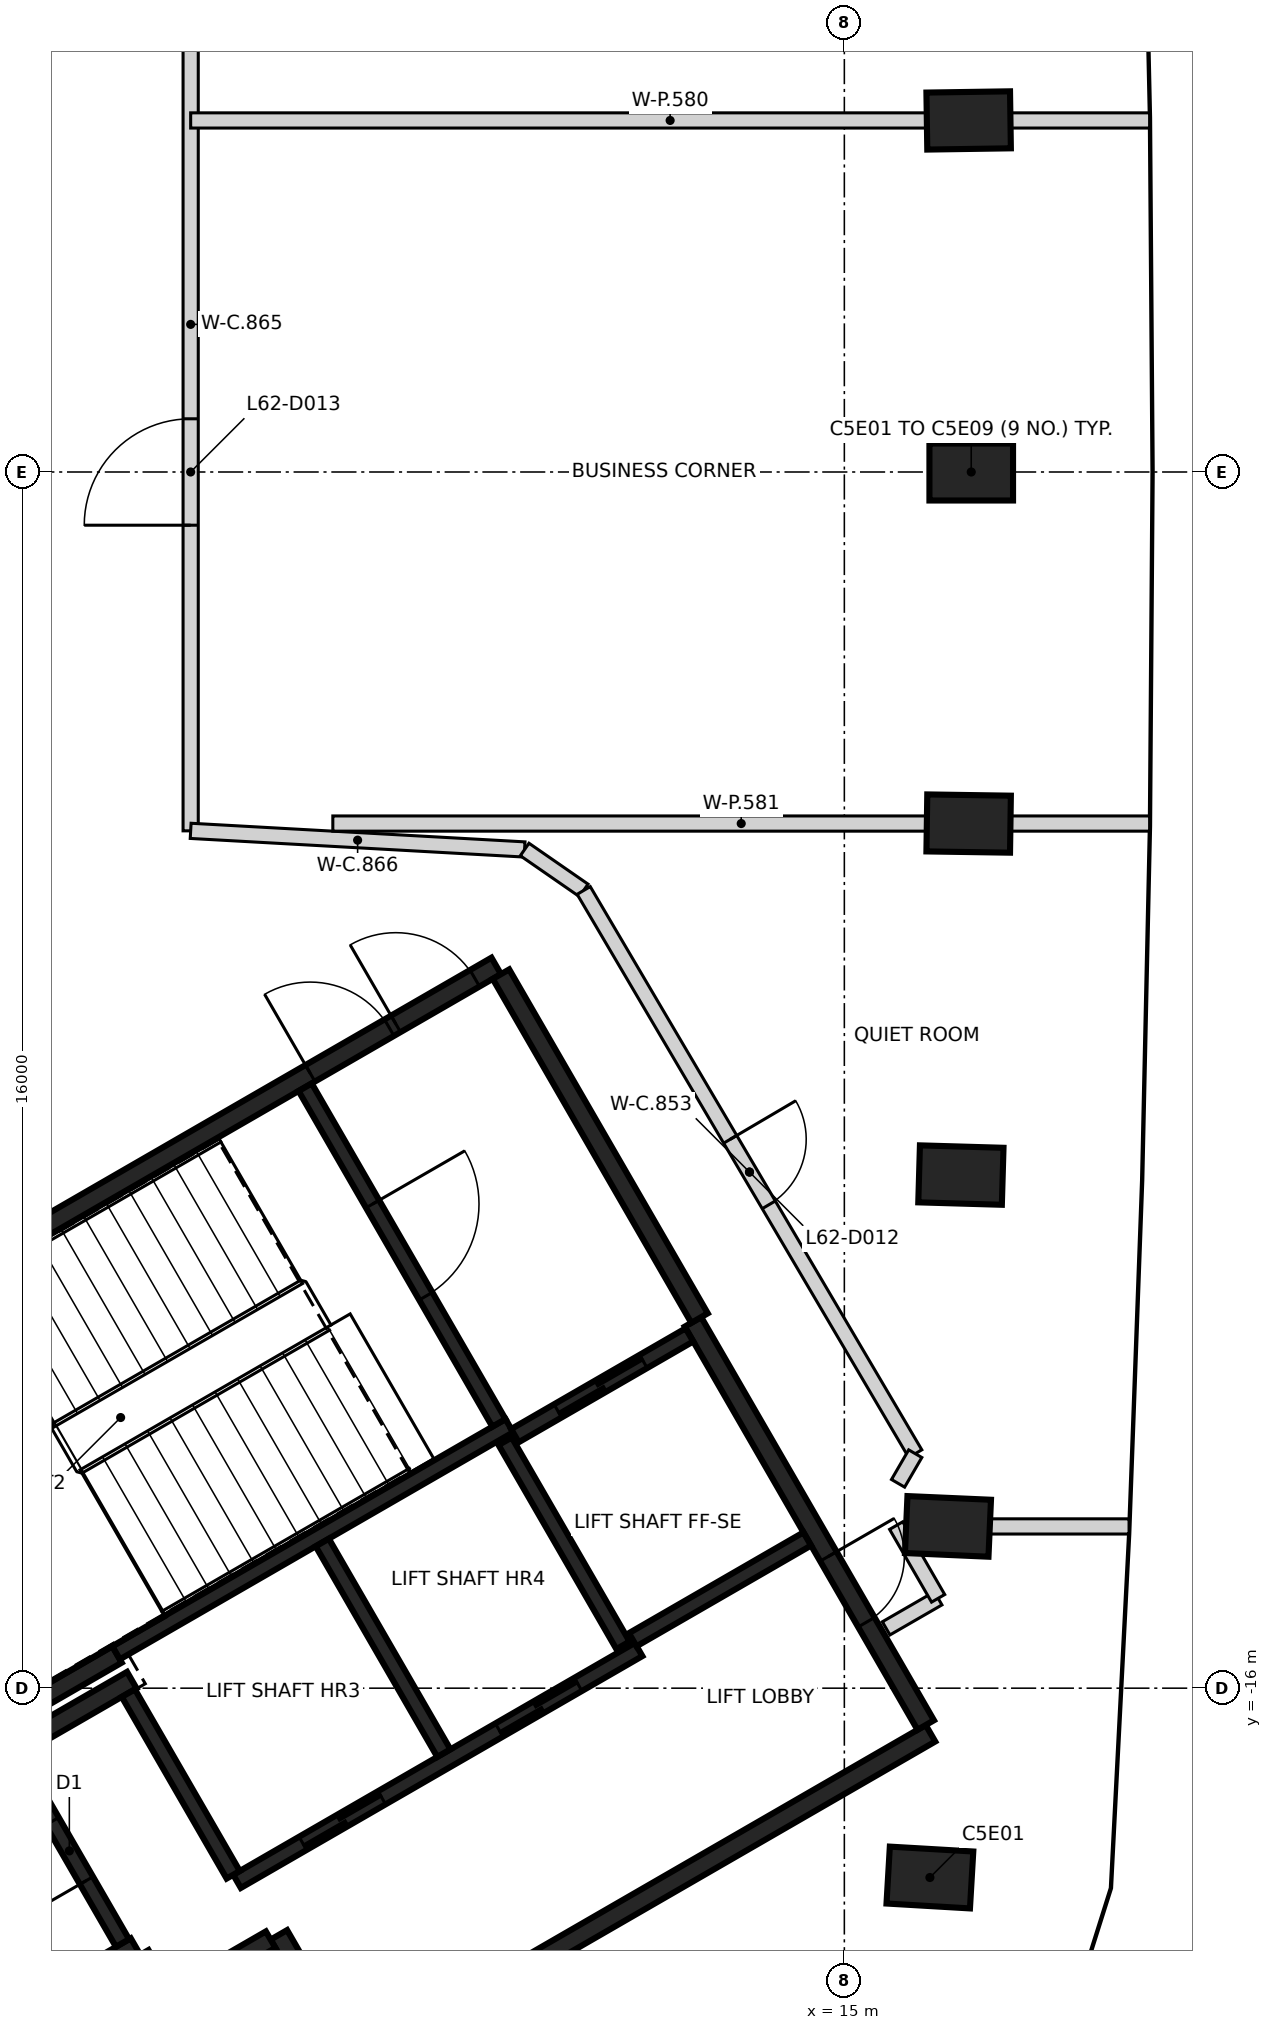
"""IFC4 building model, lengths in metres.
Left out: names, types, materials, properties, quantities, classifications, styles, units other than length and angle.
Written with IfcOpenShell. Run it as: python <this file> out.ifc"""

import sys

from ifc_helpers import new_model, si_unit, direction, frame, frame_2d, origin, origin_2d, place, context, subcontext, project, spatial, rectangle, extrude, element, fill, save


model = new_model("IFC4")
c1 = context("Model", 3, precision=1e-05, world=origin(), true_north=direction((0.0, 1.0)))
c2 = subcontext(c1, "Body", "Model", "MODEL_VIEW")
j1 = project(units=[si_unit("LENGTHUNIT", "METRE"), si_unit("PLANEANGLEUNIT", "RADIAN")], contexts=[c1])
p1 = place(None, origin())
s1 = spatial("IfcSite", under=j1, at=p1, CompositionType="ELEMENT")
p2 = place(p1, origin())
s2 = spatial("IfcBuilding", under=s1, at=p2, CompositionType="ELEMENT")
p3 = place(p2, frame((0.0, 0.0, 246.6)))
s3 = spatial("IfcBuildingStorey", under=s2, at=p3, CompositionType="ELEMENT", Elevation=246.6)
for number, where, z_axis, x_axis in (
    (1, (16.125, -18.491, -0.35), (0.0, 0.0, 1.0), (-0.998, 0.058, 0.0)),
    (2, (16.363, -13.872, -0.35), (0.0, 0.0, 1.0), (-0.999, 0.044, 0.0)),
    (3, (16.533, -9.25, -0.35), (0.0, 0.0, 1.0), (-1.0, 0.029, 0.0)),
    (4, (16.635, -4.625, -0.35), (0.0, 0.0, 1.0), (-1.0, 0.015, 0.0)),
    (5, (16.669, 0.0, -0.35), (0.0, 0.0, 1.0), (1.0, 0.0, 0.0)),
    (6, (16.635, 4.625, -0.35), (0.0, 0.0, 1.0), (1.0, 0.015, 0.0)),
):
    element("IfcColumn", number, at=place(p3, frame(where, z_axis=z_axis, x_axis=x_axis)), inside=s3, PredefinedType="COLUMN", context=c2, shape_type="SweptSolid", body=[
        extrude(rectangle(XDim=1.1, YDim=0.75, at=origin_2d()), origin(), (0.0, 0.0, 1.0), 3.6),
    ])
p4 = place(p3, frame((0.417, -12.273, 0.0), z_axis=(0.0, 0.0, 1.0), x_axis=(0.866021906294, 0.500006057782, 0.0)))
e7 = element("IfcWall", 7, at=p4, inside=s3, PredefinedType="SHEAR", context=c2, shape_type="SweptSolid", body=[
    extrude(rectangle(XDim=11.55, YDim=0.25, at=frame_2d((5.775, 0.0))), origin(), (0.0, 0.0, 1.0), 3.25),
])
p5 = place(p4, frame((10.025, 0.0, 0.0)))
e8 = element("IfcOpeningElement", 8, at=p5, cuts=e7, PredefinedType="OPENING", context=c2, shape_type="SweptSolid", body=[
    extrude(rectangle(XDim=1.2, YDim=2.1, at=frame_2d((0.6, 1.05))), frame((0.0, 0.135, 0.0), z_axis=(0.0, -1.0, 0.0), x_axis=(1.0, 0.0, 0.0)), (0.0, 0.0, 1.0), 0.27),
])
p6 = place(p4, frame((8.725, 0.0, 0.0)))
e9 = element("IfcOpeningElement", 9, at=p6, cuts=e7, PredefinedType="OPENING", context=c2, shape_type="SweptSolid", body=[
    extrude(rectangle(XDim=1.2, YDim=2.1, at=frame_2d((0.6, 1.05))), frame((0.0, 0.135, 0.0), z_axis=(0.0, -1.0, 0.0), x_axis=(1.0, 0.0, 0.0)), (0.0, 0.0, 1.0), 0.27),
])
p7 = place(p3, frame((16.133, -16.594, 0.0), z_axis=(0.0, 0.0, 1.0), x_axis=(-0.866022959057, -0.500004234368, 0.0)))
e10 = element("IfcWall", 10, at=p7, inside=s3, PredefinedType="SHEAR", context=c2, shape_type="SweptSolid", body=[
    extrude(rectangle(XDim=8.75, YDim=0.25, at=frame_2d((4.375, 0.0))), origin(), (0.0, 0.0, 1.0), 3.25),
])
p8 = place(p3, frame((13.008, -11.181, 0.0), z_axis=(0.0, 0.0, 1.0), x_axis=(0.500001955336, -0.866024274868, 0.0)))
e11 = element("IfcWall", 11, at=p8, inside=s3, PredefinedType="SHEAR", context=c2, shape_type="SweptSolid", body=[
    extrude(rectangle(XDim=6.125, YDim=0.25, at=frame_2d((3.062, 0.0))), origin(), (0.0, 0.0, 1.0), 3.25),
])
p9 = place(p8, frame((3.563, 0.0, 0.0)))
e12 = element("IfcOpeningElement", 12, at=p9, cuts=e11, PredefinedType="OPENING", context=c2, shape_type="SweptSolid", body=[
    extrude(rectangle(XDim=1.0, YDim=2.1, at=frame_2d((0.5, 1.05))), frame((0.0, 0.135, 0.0), z_axis=(0.0, -1.0, 0.0), x_axis=(1.0, 0.0, 0.0)), (0.0, 0.0, 1.0), 0.27),
])
p10 = place(p3, frame((10.483, -6.606, 0.0), z_axis=(0.0, 0.0, 1.0), x_axis=(0.49999885962, -0.866026062182, 0.0)))
e13 = element("IfcWall", 13, at=p10, inside=s3, PredefinedType="SHEAR", context=c2, shape_type="SweptSolid", body=[
    extrude(rectangle(XDim=5.225, YDim=0.25, at=frame_2d((2.612, 0.0))), origin(), (0.0, 0.0, 1.0), 3.25),
])
p11 = place(p3, frame((5.675, -19.399, 0.0), z_axis=(0.0, 0.0, 1.0), x_axis=(-0.866026637627, -0.499997862916, 0.0)))
e14 = element("IfcWall", 14, at=p11, inside=s3, PredefinedType="SHEAR", context=c2, shape_type="SweptSolid", body=[
    extrude(rectangle(XDim=2.865, YDim=0.25, at=frame_2d((1.432, 0.0))), origin(), (0.0, 0.0, 1.0), 3.25),
])
p12 = place(p3, frame((5.431, -15.556, 0.0), z_axis=(0.0, 0.0, 1.0), x_axis=(-0.866022940537, -0.500004266446, 0.0)))
e15 = element("IfcWall", 15, at=p12, inside=s3, PredefinedType="SHEAR", context=c2, shape_type="SweptSolid", body=[
    extrude(rectangle(XDim=2.575, YDim=0.25, at=frame_2d((1.287, 0.0))), origin(), (0.0, 0.0, 1.0), 3.25),
])
p13 = place(p3, frame((8.493, -20.86, 0.0), z_axis=(0.0, 0.0, 1.0), x_axis=(-0.500039802285, 0.866002422705, 0.0)))
e16 = element("IfcWall", 16, at=p13, inside=s3, PredefinedType="SHEAR", context=c2, shape_type="SweptSolid", body=[
    extrude(rectangle(XDim=1.865, YDim=0.25, at=frame_2d((0.932, 0.0))), origin(), (0.0, 0.0, 1.0), 3.25),
])
p14 = place(p3, frame((4.145, -16.749, 0.0), z_axis=(0.0, 0.0, 1.0), x_axis=(0.866038183914, 0.499977863513, 0.0)))
e17 = element("IfcWall", 17, at=p14, inside=s3, PredefinedType="SHEAR", context=c2, shape_type="SweptSolid", body=[
    extrude(rectangle(XDim=1.71, YDim=0.25, at=frame_2d((0.855, 0.0))), origin(), (0.0, 0.0, 1.0), 3.25),
])
p15 = place(p3, frame((7.452, -19.308, 0.0), z_axis=(0.0, 0.0, 1.0), x_axis=(-0.866044474677, -0.49996696679, 0.0)))
e18 = element("IfcWall", 18, at=p15, inside=s3, PredefinedType="SHEAR", context=c2, shape_type="SweptSolid", body=[
    extrude(rectangle(XDim=1.584, YDim=0.25, at=frame_2d((0.792, 0.0))), origin(), (0.0, 0.0, 1.0), 3.25),
])
p16 = place(p3, frame((6.017, -19.992, 0.0), z_axis=(0.0, 0.0, 1.0), x_axis=(-0.500364886717, 0.865814633822, 0.0)))
e19 = element("IfcWall", 19, at=p16, inside=s3, PredefinedType="SHEAR", context=c2, shape_type="SweptSolid", body=[
    extrude(rectangle(XDim=0.559, YDim=0.25, at=frame_2d((0.28, 0.0))), origin(), (0.0, 0.0, 1.0), 3.25),
])
p17 = place(p3, frame((5.419, -15.534, 0.0), z_axis=(0.0, 0.0, 1.0), x_axis=(0.866029065029, 0.499993658486, 0.0)))
e20 = element("IfcWall", 20, at=p17, inside=s3, PredefinedType="SHEAR", context=c2, shape_type="SweptSolid", body=[
    extrude(rectangle(XDim=5.974, YDim=0.2, at=frame_2d((2.987, 0.0))), origin(), (0.0, 0.0, 1.0), 3.25),
])
p18 = place(p3, frame((7.01, -18.542, 0.0), z_axis=(0.0, 0.0, 1.0), x_axis=(0.866030299012, 0.499991521122, 0.0)))
e21 = element("IfcWall", 21, at=p18, inside=s3, PredefinedType="SHEAR", context=c2, shape_type="SweptSolid", body=[
    extrude(rectangle(XDim=6.1, YDim=0.2, at=frame_2d((3.05, 0.0))), origin(), (0.0, 0.0, 1.0), 3.25),
])
p19 = place(p18, frame((1.0, 0.0, 0.0)))
e22 = element("IfcOpeningElement", 22, at=p19, cuts=e21, PredefinedType="OPENING", context=c2, shape_type="SweptSolid", body=[
    extrude(rectangle(XDim=1.2, YDim=2.1, at=frame_2d((0.6, 1.05))), frame((0.0, 0.11, 0.0), z_axis=(0.0, -1.0, 0.0), x_axis=(1.0, 0.0, 0.0)), (0.0, 0.0, 1.0), 0.22),
])
p20 = place(p18, frame((3.982, 0.0, 0.0)))
e23 = element("IfcOpeningElement", 23, at=p20, cuts=e21, PredefinedType="OPENING", context=c2, shape_type="SweptSolid", body=[
    extrude(rectangle(XDim=1.2, YDim=2.1, at=frame_2d((0.6, 1.05))), frame((0.0, 0.11, 0.0), z_axis=(0.0, -1.0, 0.0), x_axis=(1.0, 0.0, 0.0)), (0.0, 0.0, 1.0), 0.22),
])
p21 = place(p3, frame((7.906, -8.094, 0.0), z_axis=(0.0, 0.0, 1.0), x_axis=(0.500027839223, -0.866009330205, 0.0)))
e24 = element("IfcWall", 24, at=p21, inside=s3, PredefinedType="SHEAR", context=c2, shape_type="SweptSolid", body=[
    extrude(rectangle(XDim=5.098, YDim=0.2, at=frame_2d((2.549, 0.0))), origin(), (0.0, 0.0, 1.0), 3.25),
])
p22 = place(p21, frame((1.774, 0.0, 0.0)))
e25 = element("IfcOpeningElement", 25, at=p22, cuts=e24, PredefinedType="OPENING", context=c2, shape_type="SweptSolid", body=[
    extrude(rectangle(XDim=1.4, YDim=2.1, at=frame_2d((0.7, 1.05))), frame((0.0, 0.11, 0.0), z_axis=(0.0, -1.0, 0.0), x_axis=(1.0, 0.0, 0.0)), (0.0, 0.0, 1.0), 0.22),
])
p23 = place(p3, frame((8.132, -14.084, 0.0), z_axis=(0.0, 0.0, 1.0), x_axis=(0.499997778408, -0.866026686418, 0.0)))
e26 = element("IfcWall", 26, at=p23, inside=s3, PredefinedType="SHEAR", context=c2, shape_type="SweptSolid", body=[
    extrude(rectangle(XDim=3.198, YDim=0.2, at=frame_2d((1.599, 0.0))), origin(), (0.0, 0.0, 1.0), 3.25),
])
p24 = place(p3, frame((5.503, -19.352, 0.0), z_axis=(0.0, 0.0, 1.0), x_axis=(-0.499986818241, 0.866033014143, 0.0)))
e27 = element("IfcWall", 27, at=p24, inside=s3, PredefinedType="SHEAR", context=c2, shape_type="SweptSolid", body=[
    extrude(rectangle(XDim=2.798, YDim=0.2, at=frame_2d((1.399, 0.0))), origin(), (0.0, 0.0, 1.0), 3.25),
])
p25 = place(p24, frame((0.949, 0.0, 0.0)))
e28 = element("IfcOpeningElement", 28, at=p25, cuts=e27, PredefinedType="OPENING", context=c2, shape_type="SweptSolid", body=[
    extrude(rectangle(XDim=0.9, YDim=2.1, at=frame_2d((0.45, 1.05))), frame((0.0, 0.11, 0.0), z_axis=(0.0, -1.0, 0.0), x_axis=(1.0, 0.0, 0.0)), (0.0, 0.0, 1.0), 0.22),
])
p26 = place(p3, frame((6.96, -18.455, 0.0), z_axis=(0.0, 0.0, 1.0), x_axis=(-0.499926705758, 0.866067716099, 0.0)))
e29 = element("IfcWall", 29, at=p26, inside=s3, PredefinedType="SHEAR", context=c2, shape_type="SweptSolid", body=[
    extrude(rectangle(XDim=2.759, YDim=0.2, at=frame_2d((1.38, 0.0))), origin(), (0.0, 0.0, 1.0), 3.25),
])
p27 = place(p3, frame((12.088, -15.437, 0.0), z_axis=(0.0, 0.0, 1.0), x_axis=(-0.500026960575, 0.86600983753, 0.0)))
e30 = element("IfcWall", 30, at=p27, inside=s3, PredefinedType="SHEAR", context=c2, shape_type="SweptSolid", body=[
    extrude(rectangle(XDim=3.1, YDim=0.2, at=frame_2d((1.55, 0.0))), origin(), (0.0, 0.0, 1.0), 3.25),
])
p28 = place(p3, frame((10.666, -12.678, 0.0), z_axis=(0.0, 0.0, 1.0), x_axis=(0.866018407898, 0.500012117035, 0.0)))
e31 = element("IfcWall", 31, at=p28, inside=s3, PredefinedType="SHEAR", context=c2, shape_type="SweptSolid", body=[
    extrude(rectangle(XDim=2.651, YDim=0.2, at=frame_2d((1.325, 0.0))), origin(), (0.0, 0.0, 1.0), 3.25),
])
p29 = place(p28, frame((0.652, 0.0, 0.0)))
e32 = element("IfcOpeningElement", 32, at=p29, cuts=e31, PredefinedType="OPENING", context=c2, shape_type="SweptSolid", body=[
    extrude(rectangle(XDim=1.3, YDim=2.1, at=frame_2d((0.65, 1.05))), frame((0.0, 0.11, 0.0), z_axis=(0.0, -1.0, 0.0), x_axis=(1.0, 0.0, 0.0)), (0.0, 0.0, 1.0), 0.22),
])
p30 = place(p3, frame((14.512, -14.037, 0.0), z_axis=(0.0, 0.0, 1.0), x_axis=(-0.866018407898, -0.500012117035, 0.0)))
e33 = element("IfcWall", 33, at=p30, inside=s3, PredefinedType="SHEAR", context=c2, shape_type="SweptSolid", body=[
    extrude(rectangle(XDim=2.651, YDim=0.2, at=frame_2d((1.325, 0.0))), origin(), (0.0, 0.0, 1.0), 3.25),
])
p31 = place(p3, frame((6.4, -4.721, 0.0), z_axis=(0.0, 0.0, 1.0), x_axis=(0.0, 1.0, 0.0)))
e34 = element("IfcWall", 34, at=p31, inside=s3, PredefinedType="PARTITIONING", context=c2, shape_type="SweptSolid", body=[
    extrude(rectangle(XDim=13.326, YDim=0.2, at=frame_2d((6.663, 0.0))), origin(), (0.0, 0.0, 1.0), 3.25),
])
p32 = place(p31, frame((4.021, 0.0, 0.0)))
e35 = element("IfcOpeningElement", 35, at=p32, cuts=e34, PredefinedType="OPENING", context=c2, shape_type="SweptSolid", body=[
    extrude(rectangle(XDim=1.4, YDim=2.1, at=frame_2d((0.7, 1.05))), frame((0.0, 0.11, 0.0), z_axis=(0.0, -1.0, 0.0), x_axis=(1.0, 0.0, 0.0)), (0.0, 0.0, 1.0), 0.22),
])
p33 = place(p31, frame((10.865, 0.0, 0.0)))
e36 = element("IfcOpeningElement", 36, at=p33, cuts=e34, PredefinedType="OPENING", context=c2, shape_type="SweptSolid", body=[
    extrude(rectangle(XDim=1.0, YDim=2.1, at=frame_2d((0.5, 1.05))), frame((0.0, 0.11, 0.0), z_axis=(0.0, -1.0, 0.0), x_axis=(1.0, 0.0, 0.0)), (0.0, 0.0, 1.0), 0.22),
])
p34 = place(p3, frame((6.4, -4.721, 0.0), z_axis=(0.0, 0.0, 1.0), x_axis=(0.998447007366, -0.055709725208, 0.0)))
e37 = element("IfcWall", 37, at=p34, inside=s3, PredefinedType="PARTITIONING", context=c2, shape_type="SweptSolid", body=[
    extrude(rectangle(XDim=4.4, YDim=0.2, at=frame_2d((2.2, 0.0))), origin(), (0.0, 0.0, 1.0), 3.25),
])
p35 = place(p3, frame((10.794, -4.966, 0.0), z_axis=(0.0, 0.0, 1.0), x_axis=(0.822266583859, -0.569102508401, 0.0)))
e38 = element("IfcWall", 38, at=p35, inside=s3, PredefinedType="PARTITIONING", context=c2, shape_type="SweptSolid", body=[
    extrude(rectangle(XDim=0.945, YDim=0.2, at=frame_2d((0.473, 0.0))), origin(), (0.0, 0.0, 1.0), 3.25),
])
p36 = place(p3, frame((11.571, -5.505, 0.0), z_axis=(0.0, 0.0, 1.0), x_axis=(0.507291838928, -0.861774326699, 0.0)))
e39 = element("IfcWall", 39, at=p36, inside=s3, PredefinedType="PARTITIONING", context=c2, shape_type="SweptSolid", body=[
    extrude(rectangle(XDim=8.599, YDim=0.2, at=frame_2d((4.299, 0.0))), origin(), (0.0, 0.0, 1.0), 3.25),
])
p37 = place(p36, frame((3.799, 0.0, 0.0)))
e40 = element("IfcOpeningElement", 40, at=p37, cuts=e39, PredefinedType="OPENING", context=c2, shape_type="SweptSolid", body=[
    extrude(rectangle(XDim=1.0, YDim=2.1, at=frame_2d((0.5, 1.05))), frame((0.0, 0.11, 0.0), z_axis=(0.0, -1.0, 0.0), x_axis=(1.0, 0.0, 0.0)), (0.0, 0.0, 1.0), 0.22),
])
p38 = place(p3, frame((15.55, -15.213, 0.0), z_axis=(0.0, 0.0, 1.0), x_axis=(0.865989998118, 0.500061319399, 0.0)))
e41 = element("IfcWall", 41, at=p38, inside=s3, PredefinedType="PARTITIONING", context=c2, shape_type="SweptSolid", body=[
    extrude(rectangle(XDim=0.79, YDim=0.2, at=frame_2d((0.395, 0.0))), origin(), (0.0, 0.0, 1.0), 2.35),
])
p39 = place(p3, frame((15.933, -12.915, 0.0), z_axis=(0.0, 0.0, 1.0), x_axis=(-0.502017930819, -0.864857211993, 0.0)))
e42 = element("IfcWall", 42, at=p39, inside=s3, PredefinedType="PARTITIONING", context=c2, shape_type="SweptSolid", body=[
    extrude(rectangle(XDim=0.451, YDim=0.2, at=frame_2d((0.226, 0.0))), origin(), (0.0, 0.0, 1.0), 3.25),
])
p40 = place(p3, frame((15.682, -13.861, 0.0), z_axis=(0.0, 0.0, 1.0), x_axis=(0.499633176362, -0.866237085952, 0.0)))
e43 = element("IfcWall", 43, at=p40, inside=s3, PredefinedType="PARTITIONING", context=c2, shape_type="SweptSolid", body=[
    extrude(rectangle(XDim=1.105, YDim=0.2, at=frame_2d((0.552, 0.0))), origin(), (0.0, 0.0, 1.0), 2.35),
])
p41 = place(p3, frame((6.4, 4.625, 0.0), z_axis=(0.0, 0.0, 1.0), x_axis=(1.0, 0.0, 0.0)))
e44 = element("IfcWall", 44, at=p41, inside=s3, PredefinedType="PARTITIONING", context=c2, shape_type="SweptSolid", body=[
    extrude(rectangle(XDim=12.616, YDim=0.2, at=frame_2d((6.308, 0.0))), origin(), (0.0, 0.0, 1.0), 3.25),
])
p42 = place(p3, frame((8.27, -4.625, 0.0), z_axis=(0.0, 0.0, 1.0), x_axis=(1.0, 0.0, 0.0)))
e45 = element("IfcWall", 45, at=p42, inside=s3, PredefinedType="PARTITIONING", context=c2, shape_type="SweptSolid", body=[
    extrude(rectangle(XDim=10.746, YDim=0.2, at=frame_2d((5.373, 0.0))), origin(), (0.0, 0.0, 1.0), 3.25),
])
p43 = place(p3, frame((18.746, -13.872, 0.0), z_axis=(0.0, 0.0, 1.0), x_axis=(-1.0, 0.0, 0.0)))
e46 = element("IfcWall", 46, at=p43, inside=s3, PredefinedType="PARTITIONING", context=c2, shape_type="SweptSolid", body=[
    extrude(rectangle(XDim=2.711, YDim=0.2, at=frame_2d((1.356, 0.0))), origin(), (0.0, 0.0, 1.0), 3.25),
])
p44 = place(p29, origin())
e47 = element("IfcDoor", 47, at=p44, inside=s3, OperationType="SLIDING_TO_RIGHT", PredefinedType="DOOR", context=c2, shape_type="SweptSolid", body=[
    extrude(rectangle(XDim=1.3, YDim=2.1, at=frame_2d((0.65, 1.05))), frame((0.0, 0.025, 0.0), z_axis=(0.0, -1.0, 0.0), x_axis=(1.0, 0.0, 0.0)), (0.0, 0.0, 1.0), 0.05),
])
fill(e32, e47)
p45 = place(p19, origin())
e48 = element("IfcDoor", 48, at=p45, inside=s3, OperationType="DOUBLE_DOOR_SLIDING", PredefinedType="DOOR", context=c2, shape_type="SweptSolid", body=[
    extrude(rectangle(XDim=1.2, YDim=2.1, at=frame_2d((0.6, 1.05))), frame((0.0, 0.025, 0.0), z_axis=(0.0, -1.0, 0.0), x_axis=(1.0, 0.0, 0.0)), (0.0, 0.0, 1.0), 0.05),
])
fill(e22, e48)
p46 = place(p20, origin())
e49 = element("IfcDoor", 49, at=p46, inside=s3, OperationType="DOUBLE_DOOR_SLIDING", PredefinedType="DOOR", context=c2, shape_type="SweptSolid", body=[
    extrude(rectangle(XDim=1.2, YDim=2.1, at=frame_2d((0.6, 1.05))), frame((0.0, 0.025, 0.0), z_axis=(0.0, -1.0, 0.0), x_axis=(1.0, 0.0, 0.0)), (0.0, 0.0, 1.0), 0.05),
])
fill(e23, e49)
p47 = place(p9, origin())
e50 = element("IfcDoor", 50, at=p47, inside=s3, OperationType="SINGLE_SWING_LEFT", PredefinedType="DOOR", context=c2, shape_type="SweptSolid", body=[
    extrude(rectangle(XDim=1.0, YDim=2.1, at=frame_2d((0.5, 1.05))), frame((0.0, 0.025, 0.0), z_axis=(0.0, -1.0, 0.0), x_axis=(1.0, 0.0, 0.0)), (0.0, 0.0, 1.0), 0.05),
])
fill(e12, e50)
p48 = place(p5, origin())
e51 = element("IfcDoor", 51, at=p48, inside=s3, OperationType="SINGLE_SWING_LEFT", PredefinedType="DOOR", context=c2, shape_type="SweptSolid", body=[
    extrude(rectangle(XDim=1.2, YDim=2.1, at=frame_2d((0.6, 1.05))), frame((0.0, 0.025, 0.0), z_axis=(0.0, -1.0, 0.0), x_axis=(1.0, 0.0, 0.0)), (0.0, 0.0, 1.0), 0.05),
])
fill(e8, e51)
p49 = place(p6, origin())
e52 = element("IfcDoor", 52, at=p49, inside=s3, OperationType="SINGLE_SWING_RIGHT", PredefinedType="DOOR", context=c2, shape_type="SweptSolid", body=[
    extrude(rectangle(XDim=1.2, YDim=2.1, at=frame_2d((0.6, 1.05))), frame((0.0, 0.025, 0.0), z_axis=(0.0, -1.0, 0.0), x_axis=(1.0, 0.0, 0.0)), (0.0, 0.0, 1.0), 0.05),
])
fill(e9, e52)
p50 = place(p22, origin())
e53 = element("IfcDoor", 53, at=p50, inside=s3, OperationType="SINGLE_SWING_RIGHT", PredefinedType="DOOR", context=c2, shape_type="SweptSolid", body=[
    extrude(rectangle(XDim=1.4, YDim=2.1, at=frame_2d((0.7, 1.05))), frame((0.0, 0.025, 0.0), z_axis=(0.0, -1.0, 0.0), x_axis=(1.0, 0.0, 0.0)), (0.0, 0.0, 1.0), 0.05),
])
fill(e25, e53)
p51 = place(p25, origin())
e54 = element("IfcDoor", 54, at=p51, inside=s3, OperationType="SINGLE_SWING_LEFT", PredefinedType="DOOR", context=c2, shape_type="SweptSolid", body=[
    extrude(rectangle(XDim=0.9, YDim=2.1, at=frame_2d((0.45, 1.05))), frame((0.0, 0.025, 0.0), z_axis=(0.0, -1.0, 0.0), x_axis=(1.0, 0.0, 0.0)), (0.0, 0.0, 1.0), 0.05),
])
fill(e28, e54)
p52 = place(p37, origin())
e55 = element("IfcDoor", 55, at=p52, inside=s3, OperationType="SINGLE_SWING_LEFT", PredefinedType="DOOR", context=c2, shape_type="SweptSolid", body=[
    extrude(rectangle(XDim=1.0, YDim=2.1, at=frame_2d((0.5, 1.05))), frame((0.0, 0.025, 0.0), z_axis=(0.0, -1.0, 0.0), x_axis=(1.0, 0.0, 0.0)), (0.0, 0.0, 1.0), 0.05),
])
fill(e40, e55)
p53 = place(p32, frame((1.4, 0.0, 0.0), z_axis=(0.0, 0.0, 1.0), x_axis=(-1.0, 0.0, 0.0)))
e56 = element("IfcDoor", 56, at=p53, inside=s3, OperationType="DOUBLE_DOOR_SINGLE_SWING", PredefinedType="DOOR", context=c2, shape_type="SweptSolid", body=[
    extrude(rectangle(XDim=1.4, YDim=2.1, at=frame_2d((0.7, 1.05))), frame((0.0, 0.025, 0.0), z_axis=(0.0, -1.0, 0.0), x_axis=(1.0, 0.0, 0.0)), (0.0, 0.0, 1.0), 0.05),
])
fill(e35, e56)
save(model, sys.argv[1])
